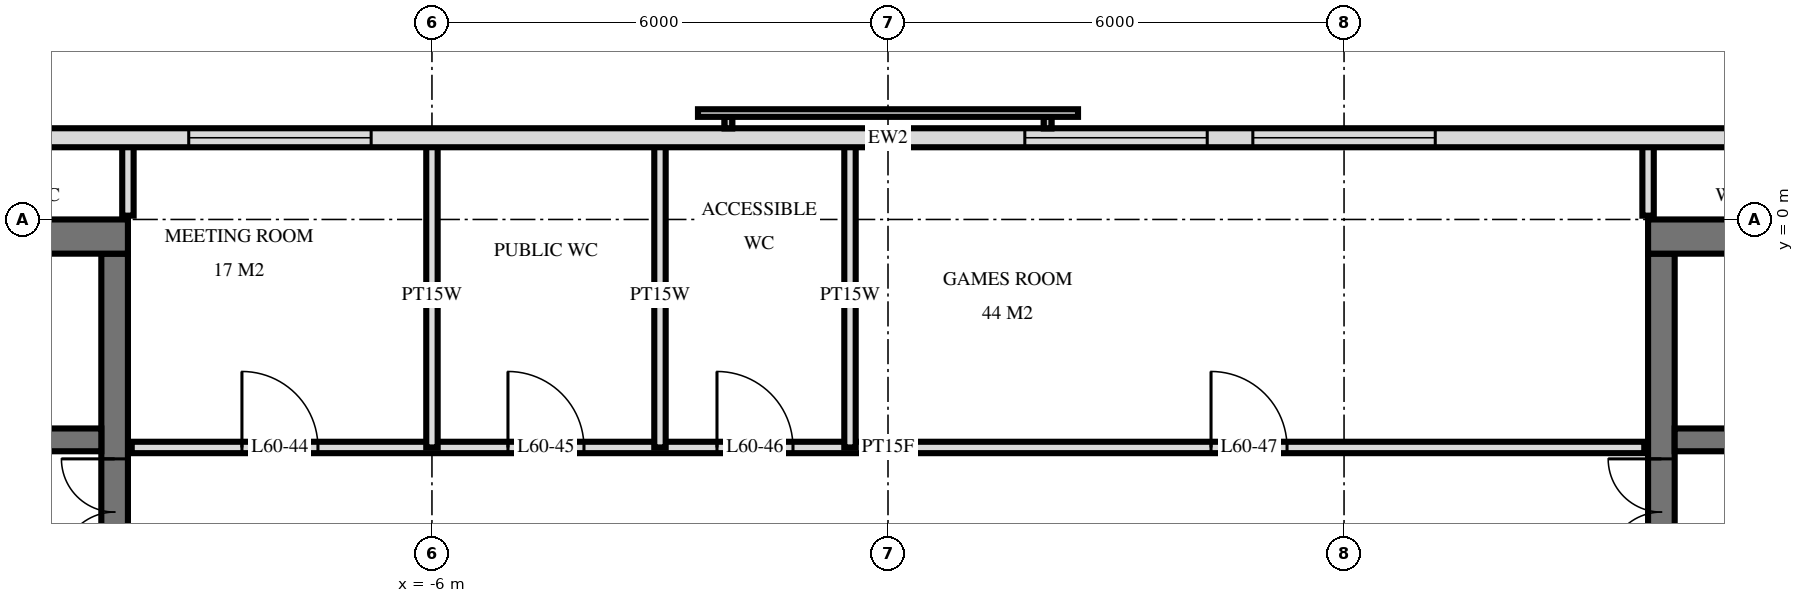
"""IFC4 building model, lengths in metres.
Left out: names, types, materials, properties, quantities, classifications, styles, units other than length and angle.
Written with IfcOpenShell. Run it as: python <this file> out.ifc"""

import sys

from ifc_helpers import new_model, si_unit, direction, frame, frame_2d, origin, place, context, subcontext, project, spatial, rectangle, extrude, element, fill, save


model = new_model("IFC4")
c1 = context("Model", 3, precision=1e-05, world=origin(), true_north=direction((0.0, 1.0)))
c2 = subcontext(c1, "Body", "Model", "MODEL_VIEW")
j1 = project(units=[si_unit("LENGTHUNIT", "METRE"), si_unit("PLANEANGLEUNIT", "RADIAN")], contexts=[c1])
p1 = place(None, origin())
s1 = spatial("IfcSite", under=j1, at=p1, CompositionType="ELEMENT")
p2 = place(p1, origin())
s2 = spatial("IfcBuilding", under=s1, at=p2, CompositionType="ELEMENT")
p3 = place(p2, frame((0.0, 0.0, 229.1)))
s3 = spatial("IfcBuildingStorey", under=s2, at=p3, CompositionType="ELEMENT", Elevation=229.1)
p4 = place(p3, frame((-24.5, -0.225, 0.0), z_axis=(0.0, 0.0, 1.0), x_axis=(1.0, 0.0, 0.0)))
e1 = element("IfcWall", 1, at=p4, inside=s3, PredefinedType="SHEAR", context=c2, shape_type="SweptSolid", body=[
    extrude(rectangle(XDim=14.5, YDim=0.45, at=frame_2d((7.25, 0.0))), origin(), (0.0, 0.0, 1.0), 3.5),
])
p5 = place(p3, frame((-10.175, -14.55, 0.0), z_axis=(0.0, 0.0, 1.0), x_axis=(0.0, 1.0, 0.0)))
e2 = element("IfcWall", 2, at=p5, inside=s3, PredefinedType="SHEAR", context=c2, shape_type="SweptSolid", body=[
    extrude(rectangle(XDim=14.1, YDim=0.35, at=frame_2d((7.05, 0.0))), origin(), (0.0, 0.0, 1.0), 3.5),
])
p6 = place(p5, frame((8.4, 0.0, 0.0)))
e3 = element("IfcOpeningElement", 3, at=p6, cuts=e2, PredefinedType="OPENING", context=c2, shape_type="SweptSolid", body=[
    extrude(rectangle(XDim=1.4, YDim=2.4, at=frame_2d((0.7, 1.2))), frame((0.0, 0.185, 0.0), z_axis=(0.0, -1.0, 0.0), x_axis=(1.0, 0.0, 0.0)), (0.0, 0.0, 1.0), 0.37),
])
p7 = place(p5, frame((10.0, 0.0, 0.0)))
e4 = element("IfcOpeningElement", 4, at=p7, cuts=e2, PredefinedType="OPENING", context=c2, shape_type="SweptSolid", body=[
    extrude(rectangle(XDim=1.4, YDim=2.4, at=frame_2d((0.7, 1.2))), frame((0.0, 0.185, 0.0), z_axis=(0.0, -1.0, 0.0), x_axis=(1.0, 0.0, 0.0)), (0.0, 0.0, 1.0), 0.37),
])
p8 = place(p5, frame((4.0, 0.0, 0.0)))
e5 = element("IfcOpeningElement", 5, at=p8, cuts=e2, PredefinedType="OPENING", context=c2, shape_type="SweptSolid", body=[
    extrude(rectangle(XDim=1.2, YDim=2.1, at=frame_2d((0.6, 1.05))), frame((0.0, 0.185, 0.0), z_axis=(0.0, -1.0, 0.0), x_axis=(1.0, 0.0, 0.0)), (0.0, 0.0, 1.0), 0.37),
])
p9 = place(p3, frame((-24.05, -2.9, 0.0), z_axis=(0.0, 0.0, 1.0), x_axis=(1.0, 0.0, 0.0)))
e6 = element("IfcWall", 6, at=p9, inside=s3, PredefinedType="SHEAR", context=c2, shape_type="SweptSolid", body=[
    extrude(rectangle(XDim=13.7, YDim=0.3, at=frame_2d((6.85, 0.0))), origin(), (0.0, 0.0, 1.0), 3.5),
])
p10 = place(p9, frame((0.55, 0.0, 0.0)))
e7 = element("IfcOpeningElement", 7, at=p10, cuts=e6, PredefinedType="OPENING", context=c2, shape_type="SweptSolid", body=[
    extrude(rectangle(XDim=1.1, YDim=2.1, at=frame_2d((0.55, 1.05))), frame((0.0, 0.16, 0.0), z_axis=(0.0, -1.0, 0.0), x_axis=(1.0, 0.0, 0.0)), (0.0, 0.0, 1.0), 0.32),
])
p11 = place(p9, frame((5.9, 0.0, 0.0)))
e8 = element("IfcOpeningElement", 8, at=p11, cuts=e6, PredefinedType="OPENING", context=c2, shape_type="SweptSolid", body=[
    extrude(rectangle(XDim=0.9, YDim=2.1, at=frame_2d((0.45, 1.05))), frame((0.0, 0.16, 0.0), z_axis=(0.0, -1.0, 0.0), x_axis=(1.0, 0.0, 0.0)), (0.0, 0.0, 1.0), 0.32),
])
p12 = place(p9, frame((11.85, 0.0, 0.0)))
e9 = element("IfcOpeningElement", 9, at=p12, cuts=e6, PredefinedType="OPENING", context=c2, shape_type="SweptSolid", body=[
    extrude(rectangle(XDim=1.0, YDim=2.1, at=frame_2d((0.5, 1.05))), frame((0.0, 0.16, 0.0), z_axis=(0.0, -1.0, 0.0), x_axis=(1.0, 0.0, 0.0)), (0.0, 0.0, 1.0), 0.32),
])
p13 = place(p9, frame((8.85, 0.0, 0.0)))
e10 = element("IfcOpeningElement", 10, at=p13, cuts=e6, PredefinedType="OPENING", context=c2, shape_type="SweptSolid", body=[
    extrude(rectangle(XDim=1.0, YDim=2.1, at=frame_2d((0.5, 1.05))), frame((0.0, 0.16, 0.0), z_axis=(0.0, -1.0, 0.0), x_axis=(1.0, 0.0, 0.0)), (0.0, 0.0, 1.0), 0.32),
])
p14 = place(p9, frame((3.0, 0.0, 0.0)))
e11 = element("IfcOpeningElement", 11, at=p14, cuts=e6, PredefinedType="OPENING", context=c2, shape_type="SweptSolid", body=[
    extrude(rectangle(XDim=1.0, YDim=2.1, at=frame_2d((0.5, 1.05))), frame((0.0, 0.16, 0.0), z_axis=(0.0, -1.0, 0.0), x_axis=(1.0, 0.0, 0.0)), (0.0, 0.0, 1.0), 0.32),
])
p15 = place(p3, frame((10.0, -0.225, 0.0), z_axis=(0.0, 0.0, 1.0), x_axis=(1.0, 0.0, 0.0)))
e12 = element("IfcWall", 12, at=p15, inside=s3, PredefinedType="SHEAR", context=c2, shape_type="SweptSolid", body=[
    extrude(rectangle(XDim=14.5, YDim=0.45, at=frame_2d((7.25, 0.0))), origin(), (0.0, 0.0, 1.0), 3.5),
])
p16 = place(p3, frame((10.175, -14.55, 0.0), z_axis=(0.0, 0.0, 1.0), x_axis=(0.0, 1.0, 0.0)))
e13 = element("IfcWall", 13, at=p16, inside=s3, PredefinedType="SHEAR", context=c2, shape_type="SweptSolid", body=[
    extrude(rectangle(XDim=14.1, YDim=0.35, at=frame_2d((7.05, 0.0))), origin(), (0.0, 0.0, 1.0), 3.5),
])
p17 = place(p16, frame((8.4, 0.0, 0.0)))
e14 = element("IfcOpeningElement", 14, at=p17, cuts=e13, PredefinedType="OPENING", context=c2, shape_type="SweptSolid", body=[
    extrude(rectangle(XDim=1.4, YDim=2.4, at=frame_2d((0.7, 1.2))), frame((0.0, 0.185, 0.0), z_axis=(0.0, -1.0, 0.0), x_axis=(1.0, 0.0, 0.0)), (0.0, 0.0, 1.0), 0.37),
])
p18 = place(p16, frame((10.0, 0.0, 0.0)))
e15 = element("IfcOpeningElement", 15, at=p18, cuts=e13, PredefinedType="OPENING", context=c2, shape_type="SweptSolid", body=[
    extrude(rectangle(XDim=1.4, YDim=2.4, at=frame_2d((0.7, 1.2))), frame((0.0, 0.185, 0.0), z_axis=(0.0, -1.0, 0.0), x_axis=(1.0, 0.0, 0.0)), (0.0, 0.0, 1.0), 0.37),
])
p19 = place(p16, frame((4.0, 0.0, 0.0)))
e16 = element("IfcOpeningElement", 16, at=p19, cuts=e13, PredefinedType="OPENING", context=c2, shape_type="SweptSolid", body=[
    extrude(rectangle(XDim=1.2, YDim=2.1, at=frame_2d((0.6, 1.05))), frame((0.0, 0.185, 0.0), z_axis=(0.0, -1.0, 0.0), x_axis=(1.0, 0.0, 0.0)), (0.0, 0.0, 1.0), 0.37),
])
p20 = place(p3, frame((10.35, -2.9, 0.0), z_axis=(0.0, 0.0, 1.0), x_axis=(1.0, 0.0, 0.0)))
e17 = element("IfcWall", 17, at=p20, inside=s3, PredefinedType="SHEAR", context=c2, shape_type="SweptSolid", body=[
    extrude(rectangle(XDim=13.7, YDim=0.3, at=frame_2d((6.85, 0.0))), origin(), (0.0, 0.0, 1.0), 3.5),
])
p21 = place(p20, frame((12.05, 0.0, 0.0)))
e18 = element("IfcOpeningElement", 18, at=p21, cuts=e17, PredefinedType="OPENING", context=c2, shape_type="SweptSolid", body=[
    extrude(rectangle(XDim=1.1, YDim=2.1, at=frame_2d((0.55, 1.05))), frame((0.0, 0.16, 0.0), z_axis=(0.0, -1.0, 0.0), x_axis=(1.0, 0.0, 0.0)), (0.0, 0.0, 1.0), 0.32),
])
p22 = place(p20, frame((6.9, 0.0, 0.0)))
e19 = element("IfcOpeningElement", 19, at=p22, cuts=e17, PredefinedType="OPENING", context=c2, shape_type="SweptSolid", body=[
    extrude(rectangle(XDim=0.9, YDim=2.1, at=frame_2d((0.45, 1.05))), frame((0.0, 0.16, 0.0), z_axis=(0.0, -1.0, 0.0), x_axis=(1.0, 0.0, 0.0)), (0.0, 0.0, 1.0), 0.32),
])
p23 = place(p20, frame((0.85, 0.0, 0.0)))
e20 = element("IfcOpeningElement", 20, at=p23, cuts=e17, PredefinedType="OPENING", context=c2, shape_type="SweptSolid", body=[
    extrude(rectangle(XDim=1.0, YDim=2.1, at=frame_2d((0.5, 1.05))), frame((0.0, 0.16, 0.0), z_axis=(0.0, -1.0, 0.0), x_axis=(1.0, 0.0, 0.0)), (0.0, 0.0, 1.0), 0.32),
])
p24 = place(p20, frame((3.85, 0.0, 0.0)))
e21 = element("IfcOpeningElement", 21, at=p24, cuts=e17, PredefinedType="OPENING", context=c2, shape_type="SweptSolid", body=[
    extrude(rectangle(XDim=1.0, YDim=2.1, at=frame_2d((0.5, 1.05))), frame((0.0, 0.16, 0.0), z_axis=(0.0, -1.0, 0.0), x_axis=(1.0, 0.0, 0.0)), (0.0, 0.0, 1.0), 0.32),
])
p25 = place(p20, frame((9.7, 0.0, 0.0)))
e22 = element("IfcOpeningElement", 22, at=p25, cuts=e17, PredefinedType="OPENING", context=c2, shape_type="SweptSolid", body=[
    extrude(rectangle(XDim=1.0, YDim=2.1, at=frame_2d((0.5, 1.05))), frame((0.0, 0.16, 0.0), z_axis=(0.0, -1.0, 0.0), x_axis=(1.0, 0.0, 0.0)), (0.0, 0.0, 1.0), 0.32),
])
p26 = place(p3, frame((22.475, 1.075, 0.0), z_axis=(0.0, 0.0, 1.0), x_axis=(-1.0, 0.0, 0.0)))
e23 = element("IfcWall", 23, at=p26, inside=s3, PredefinedType="SOLIDWALL", context=c2, shape_type="SweptSolid", body=[
    extrude(rectangle(XDim=44.951, YDim=0.25, at=frame_2d((22.475, 0.0))), origin(), (0.0, 0.0, 1.0), 3.22),
])
p27 = place(p26, frame((15.275, 0.0, 0.9)))
e24 = element("IfcOpeningElement", 24, at=p27, cuts=e23, PredefinedType="OPENING", context=c2, shape_type="SweptSolid", body=[
    extrude(rectangle(XDim=2.4, YDim=1.5, at=frame_2d((1.2, 0.75))), frame((0.0, 0.135, 0.0), z_axis=(0.0, -1.0, 0.0), x_axis=(1.0, 0.0, 0.0)), (0.0, 0.0, 1.0), 0.27),
])
p28 = place(p26, frame((18.275, 0.0, 0.9)))
e25 = element("IfcOpeningElement", 25, at=p28, cuts=e23, PredefinedType="OPENING", context=c2, shape_type="SweptSolid", body=[
    extrude(rectangle(XDim=2.4, YDim=1.5, at=frame_2d((1.2, 0.75))), frame((0.0, 0.135, 0.0), z_axis=(0.0, -1.0, 0.0), x_axis=(1.0, 0.0, 0.0)), (0.0, 0.0, 1.0), 0.27),
])
p29 = place(p26, frame((29.275, 0.0, 0.9)))
e26 = element("IfcOpeningElement", 26, at=p29, cuts=e23, PredefinedType="OPENING", context=c2, shape_type="SweptSolid", body=[
    extrude(rectangle(XDim=2.4, YDim=1.5, at=frame_2d((1.2, 0.75))), frame((0.0, 0.135, 0.0), z_axis=(0.0, -1.0, 0.0), x_axis=(1.0, 0.0, 0.0)), (0.0, 0.0, 1.0), 0.27),
])
p30 = place(p3, frame((10.0, 0.05, 0.0), z_axis=(0.0, 0.0, 1.0), x_axis=(0.0, 1.0, 0.0)))
e27 = element("IfcWall", 27, at=p30, inside=s3, PredefinedType="PARTITIONING", context=c2, shape_type="SweptSolid", body=[
    extrude(rectangle(XDim=0.97, YDim=0.15, at=frame_2d((0.485, 0.0))), origin(), (0.0, 0.0, 1.0), 3.22),
])
for number, where, z_axis, x_axis in (
    (28, (-0.5, -3.0, 0.0), (0.0, 0.0, 1.0), (0.0, 1.0, 0.0)),
    (29, (-3.0, -3.0, 0.0), (0.0, 0.0, 1.0), (0.0, 1.0, 0.0)),
    (30, (-6.0, -3.0, 0.0), (0.0, 0.0, 1.0), (0.0, 1.0, 0.0)),
):
    element("IfcWall", number, at=place(p3, frame(where, z_axis=z_axis, x_axis=x_axis)), inside=s3, PredefinedType="PLUMBINGWALL", context=c2, shape_type="SweptSolid", body=[
        extrude(rectangle(XDim=4.02, YDim=0.15, at=frame_2d((2.01, 0.0))), origin(), (0.0, 0.0, 1.0), 3.22),
    ])
p31 = place(p3, frame((-10.0, 0.05, 0.0), z_axis=(0.0, 0.0, 1.0), x_axis=(0.0, 1.0, 0.0)))
e31 = element("IfcWall", 31, at=p31, inside=s3, PredefinedType="PARTITIONING", context=c2, shape_type="SweptSolid", body=[
    extrude(rectangle(XDim=0.97, YDim=0.15, at=frame_2d((0.485, 0.0))), origin(), (0.0, 0.0, 1.0), 3.22),
])
p32 = place(p3, frame((-9.95, -3.0, 0.0), z_axis=(0.0, 0.0, 1.0), x_axis=(1.0, 0.0, 0.0)))
e32 = element("IfcWall", 32, at=p32, inside=s3, PredefinedType="PARTITIONING", context=c2, shape_type="SweptSolid", body=[
    extrude(rectangle(XDim=19.9, YDim=0.15, at=frame_2d((9.95, 0.0))), origin(), (0.0, 0.0, 1.0), 3.22),
])
p33 = place(p32, frame((1.45, 0.0, 0.0)))
e33 = element("IfcOpeningElement", 33, at=p33, cuts=e32, PredefinedType="OPENING", context=c2, shape_type="SweptSolid", body=[
    extrude(rectangle(XDim=1.0, YDim=2.1, at=frame_2d((0.5, 1.05))), frame((0.0, 0.085, 0.0), z_axis=(0.0, -1.0, 0.0), x_axis=(1.0, 0.0, 0.0)), (0.0, 0.0, 1.0), 0.17),
])
p34 = place(p32, frame((4.95, 0.0, 0.0)))
e34 = element("IfcOpeningElement", 34, at=p34, cuts=e32, PredefinedType="OPENING", context=c2, shape_type="SweptSolid", body=[
    extrude(rectangle(XDim=1.0, YDim=2.1, at=frame_2d((0.5, 1.05))), frame((0.0, 0.085, 0.0), z_axis=(0.0, -1.0, 0.0), x_axis=(1.0, 0.0, 0.0)), (0.0, 0.0, 1.0), 0.17),
])
p35 = place(p32, frame((7.7, 0.0, 0.0)))
e35 = element("IfcOpeningElement", 35, at=p35, cuts=e32, PredefinedType="OPENING", context=c2, shape_type="SweptSolid", body=[
    extrude(rectangle(XDim=1.0, YDim=2.1, at=frame_2d((0.5, 1.05))), frame((0.0, 0.085, 0.0), z_axis=(0.0, -1.0, 0.0), x_axis=(1.0, 0.0, 0.0)), (0.0, 0.0, 1.0), 0.17),
])
p36 = place(p32, frame((14.2, 0.0, 0.0)))
e36 = element("IfcOpeningElement", 36, at=p36, cuts=e32, PredefinedType="OPENING", context=c2, shape_type="SweptSolid", body=[
    extrude(rectangle(XDim=1.0, YDim=2.1, at=frame_2d((0.5, 1.05))), frame((0.0, 0.085, 0.0), z_axis=(0.0, -1.0, 0.0), x_axis=(1.0, 0.0, 0.0)), (0.0, 0.0, 1.0), 0.17),
])
p37 = place(p27, origin())
e37 = element("IfcWindow", 37, at=p37, inside=s3, PartitioningType="SINGLE_PANEL", PredefinedType="WINDOW", context=c2, shape_type="SweptSolid", body=[
    extrude(rectangle(XDim=2.4, YDim=1.5, at=frame_2d((1.2, 0.75))), frame((0.0, 0.03, 0.0), z_axis=(0.0, -1.0, 0.0), x_axis=(1.0, 0.0, 0.0)), (0.0, 0.0, 1.0), 0.06),
])
fill(e24, e37)
p38 = place(p28, origin())
e38 = element("IfcWindow", 38, at=p38, inside=s3, PartitioningType="SINGLE_PANEL", PredefinedType="WINDOW", context=c2, shape_type="SweptSolid", body=[
    extrude(rectangle(XDim=2.4, YDim=1.5, at=frame_2d((1.2, 0.75))), frame((0.0, 0.03, 0.0), z_axis=(0.0, -1.0, 0.0), x_axis=(1.0, 0.0, 0.0)), (0.0, 0.0, 1.0), 0.06),
])
fill(e25, e38)
p39 = place(p29, origin())
e39 = element("IfcWindow", 39, at=p39, inside=s3, PartitioningType="SINGLE_PANEL", PredefinedType="WINDOW", context=c2, shape_type="SweptSolid", body=[
    extrude(rectangle(XDim=2.4, YDim=1.5, at=frame_2d((1.2, 0.75))), frame((0.0, 0.03, 0.0), z_axis=(0.0, -1.0, 0.0), x_axis=(1.0, 0.0, 0.0)), (0.0, 0.0, 1.0), 0.06),
])
fill(e26, e39)
p40 = place(p7, origin())
e40 = element("IfcDoor", 40, at=p40, inside=s3, OperationType="DOUBLE_DOOR_SINGLE_SWING", PredefinedType="DOOR", context=c2, shape_type="SweptSolid", body=[
    extrude(rectangle(XDim=1.4, YDim=2.4, at=frame_2d((0.7, 1.2))), frame((0.0, 0.025, 0.0), z_axis=(0.0, -1.0, 0.0), x_axis=(1.0, 0.0, 0.0)), (0.0, 0.0, 1.0), 0.05),
])
fill(e4, e40)
p41 = place(p18, origin())
e41 = element("IfcDoor", 41, at=p41, inside=s3, OperationType="DOUBLE_DOOR_SINGLE_SWING", PredefinedType="DOOR", context=c2, shape_type="SweptSolid", body=[
    extrude(rectangle(XDim=1.4, YDim=2.4, at=frame_2d((0.7, 1.2))), frame((0.0, 0.025, 0.0), z_axis=(0.0, -1.0, 0.0), x_axis=(1.0, 0.0, 0.0)), (0.0, 0.0, 1.0), 0.05),
])
fill(e15, e41)
p42 = place(p33, origin())
e42 = element("IfcDoor", 42, at=p42, inside=s3, OperationType="SINGLE_SWING_RIGHT", PredefinedType="DOOR", context=c2, shape_type="SweptSolid", body=[
    extrude(rectangle(XDim=1.0, YDim=2.1, at=frame_2d((0.5, 1.05))), frame((0.0, 0.025, 0.0), z_axis=(0.0, -1.0, 0.0), x_axis=(1.0, 0.0, 0.0)), (0.0, 0.0, 1.0), 0.05),
])
fill(e33, e42)
p43 = place(p34, origin())
e43 = element("IfcDoor", 43, at=p43, inside=s3, OperationType="SINGLE_SWING_RIGHT", PredefinedType="DOOR", context=c2, shape_type="SweptSolid", body=[
    extrude(rectangle(XDim=1.0, YDim=2.1, at=frame_2d((0.5, 1.05))), frame((0.0, 0.025, 0.0), z_axis=(0.0, -1.0, 0.0), x_axis=(1.0, 0.0, 0.0)), (0.0, 0.0, 1.0), 0.05),
])
fill(e34, e43)
p44 = place(p35, origin())
e44 = element("IfcDoor", 44, at=p44, inside=s3, OperationType="SINGLE_SWING_RIGHT", PredefinedType="DOOR", context=c2, shape_type="SweptSolid", body=[
    extrude(rectangle(XDim=1.0, YDim=2.1, at=frame_2d((0.5, 1.05))), frame((0.0, 0.025, 0.0), z_axis=(0.0, -1.0, 0.0), x_axis=(1.0, 0.0, 0.0)), (0.0, 0.0, 1.0), 0.05),
])
fill(e35, e44)
p45 = place(p36, origin())
e45 = element("IfcDoor", 45, at=p45, inside=s3, OperationType="SINGLE_SWING_RIGHT", PredefinedType="DOOR", context=c2, shape_type="SweptSolid", body=[
    extrude(rectangle(XDim=1.0, YDim=2.1, at=frame_2d((0.5, 1.05))), frame((0.0, 0.025, 0.0), z_axis=(0.0, -1.0, 0.0), x_axis=(1.0, 0.0, 0.0)), (0.0, 0.0, 1.0), 0.05),
])
fill(e36, e45)
save(model, sys.argv[1])
